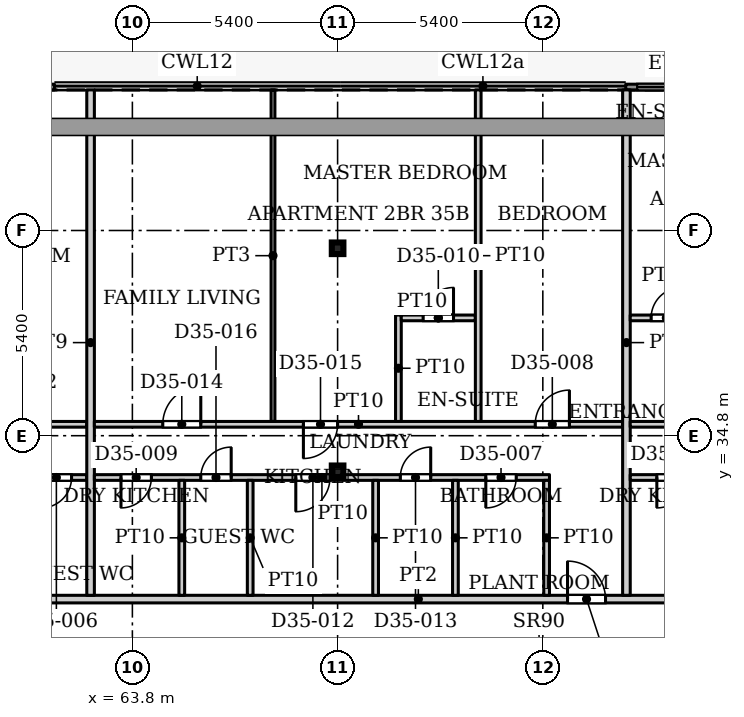
"""IFC4 building model, lengths in metres.
Left out: names, types, materials, properties, quantities, classifications, styles, units other than length and angle.
Written with IfcOpenShell. Run it as: python <this file> out.ifc"""

import sys

from ifc_helpers import new_model, si_unit, direction, frame, frame_2d, origin, origin_2d, place, context, subcontext, project, spatial, rectangle, hollow_rectangle, extrude, source, transform, mapped, element, fill, save


model = new_model("IFC4")
c1 = context("Model", 3, precision=1e-05, world=origin(), true_north=direction((0.0, 1.0)))
c2 = subcontext(c1, "Body", "Model", "MODEL_VIEW")
j1 = project(units=[si_unit("LENGTHUNIT", "METRE"), si_unit("PLANEANGLEUNIT", "RADIAN")], contexts=[c1])
p1 = place(None, origin())
s1 = spatial("IfcSite", under=j1, at=p1, CompositionType="ELEMENT")
p2 = place(p1, origin())
s2 = spatial("IfcBuilding", under=s1, at=p2, CompositionType="ELEMENT")
p3 = place(p2, frame((0.0, 0.0, 152.6)))
s3 = spatial("IfcBuildingStorey", under=s2, at=p3, CompositionType="ELEMENT", Elevation=152.6)
for number, where, z_axis, x_axis in (
    (1, (69.2, 33.863, 0.0), (0.0, 0.0, 1.0), (1.0, 0.0, 0.0)),
    (2, (69.2, 39.732, 0.0), (0.0, 0.0, 1.0), (1.0, 0.0, 0.0)),
):
    element("IfcColumn", number, at=place(p3, frame(where, z_axis=z_axis, x_axis=x_axis)), inside=s3, PredefinedType="COLUMN", context=c2, shape_type="SweptSolid", body=[
        extrude(hollow_rectangle(XDim=0.305, YDim=0.305, WallThickness=0.016, InnerFilletRadius=0.016, OuterFilletRadius=0.032, at=origin_2d()), origin(), (0.0, 0.0, 1.0), 3.9),
    ])
p4 = place(p3, frame((59.347, 43.975, 0.0), z_axis=(0.0, 0.0, 1.0), x_axis=(1.0, 0.0, 0.0)))
e3 = element("IfcWall", 3, at=p4, inside=s3, PredefinedType="SOLIDWALL", context=c2, shape_type="SweptSolid", body=[
    extrude(rectangle(XDim=2.401, YDim=0.15, at=frame_2d((1.201, 0.0))), origin(), (0.0, 0.0, 1.0), 3.75),
])
p5 = place(p4, frame((0.3, 0.0, 0.0)))
e4 = element("IfcOpeningElement", 4, at=p5, cuts=e3, PredefinedType="OPENING", context=c2, shape_type="SweptSolid", body=[
    extrude(rectangle(XDim=1.8, YDim=2.4, at=frame_2d((0.9, 1.2))), frame((0.0, 0.085, 0.0), z_axis=(0.0, -1.0, 0.0), x_axis=(1.0, 0.0, 0.0)), (0.0, 0.0, 1.0), 0.17),
])
p6 = place(p3, frame((76.782, 43.975, 0.0), z_axis=(0.0, 0.0, 1.0), x_axis=(1.0, 0.0, 0.0)))
e5 = element("IfcWall", 5, at=p6, inside=s3, PredefinedType="SOLIDWALL", context=c2, shape_type="SweptSolid", body=[
    extrude(rectangle(XDim=2.4, YDim=0.15, at=frame_2d((1.2, 0.0))), origin(), (0.0, 0.0, 1.0), 3.75),
])
p7 = place(p6, frame((0.3, 0.0, 0.0)))
e6 = element("IfcOpeningElement", 6, at=p7, cuts=e5, PredefinedType="OPENING", context=c2, shape_type="SweptSolid", body=[
    extrude(rectangle(XDim=1.8, YDim=2.4, at=frame_2d((0.9, 1.2))), frame((0.0, 0.085, 0.0), z_axis=(0.0, -1.0, 0.0), x_axis=(1.0, 0.0, 0.0)), (0.0, 0.0, 1.0), 0.17),
])
p8 = place(p3, frame((53.549, 30.5, 0.0), z_axis=(0.0, 0.0, 1.0), x_axis=(1.0, 0.0, 0.0)))
e7 = element("IfcWall", 7, at=p8, inside=s3, PredefinedType="PARTITIONING", context=c2, shape_type="SweptSolid", body=[
    extrude(rectangle(XDim=35.551, YDim=0.2, at=frame_2d((17.775, 0.0))), origin(), (0.0, 0.0, 1.0), 3.6),
])
p9 = place(p8, frame((0.251, 0.0, 0.0)))
e8 = element("IfcOpeningElement", 8, at=p9, cuts=e7, PredefinedType="OPENING", context=c2, shape_type="SweptSolid", body=[
    extrude(rectangle(XDim=1.0, YDim=2.1, at=frame_2d((0.5, 1.05))), frame((0.0, 0.11, 0.0), z_axis=(0.0, -1.0, 0.0), x_axis=(1.0, 0.0, 0.0)), (0.0, 0.0, 1.0), 0.22),
])
p10 = place(p8, frame((21.701, 0.0, 0.0)))
e9 = element("IfcOpeningElement", 9, at=p10, cuts=e7, PredefinedType="OPENING", context=c2, shape_type="SweptSolid", body=[
    extrude(rectangle(XDim=1.0, YDim=2.1, at=frame_2d((0.5, 1.05))), frame((0.0, 0.11, 0.0), z_axis=(0.0, -1.0, 0.0), x_axis=(1.0, 0.0, 0.0)), (0.0, 0.0, 1.0), 0.22),
])
p11 = place(p8, frame((32.201, 0.0, 0.0)))
e10 = element("IfcOpeningElement", 10, at=p11, cuts=e7, PredefinedType="OPENING", context=c2, shape_type="SweptSolid", body=[
    extrude(rectangle(XDim=1.0, YDim=2.1, at=frame_2d((0.5, 1.05))), frame((0.0, 0.11, 0.0), z_axis=(0.0, -1.0, 0.0), x_axis=(1.0, 0.0, 0.0)), (0.0, 0.0, 1.0), 0.22),
])
p12 = place(p3, frame((53.549, 35.1, 0.0), z_axis=(0.0, 0.0, 1.0), x_axis=(1.0, 0.0, 0.0)))
e11 = element("IfcWall", 11, at=p12, inside=s3, PredefinedType="PARTITIONING", context=c2, shape_type="SweptSolid", body=[
    extrude(rectangle(XDim=9.051, YDim=0.15, at=frame_2d((4.525, 0.0))), origin(), (0.0, 0.0, 1.0), 3.6),
])
p13 = place(p12, frame((6.751, 0.0, 0.0)))
e12 = element("IfcOpeningElement", 12, at=p13, cuts=e11, PredefinedType="OPENING", context=c2, shape_type="SweptSolid", body=[
    extrude(rectangle(XDim=0.9, YDim=2.1, at=frame_2d((0.45, 1.05))), frame((0.0, 0.085, 0.0), z_axis=(0.0, -1.0, 0.0), x_axis=(1.0, 0.0, 0.0)), (0.0, 0.0, 1.0), 0.17),
])
p14 = place(p12, frame((2.051, 0.0, 0.0)))
e13 = element("IfcOpeningElement", 13, at=p14, cuts=e11, PredefinedType="OPENING", context=c2, shape_type="SweptSolid", body=[
    extrude(rectangle(XDim=1.0, YDim=2.1, at=frame_2d((0.5, 1.05))), frame((0.0, 0.085, 0.0), z_axis=(0.0, -1.0, 0.0), x_axis=(1.0, 0.0, 0.0)), (0.0, 0.0, 1.0), 0.17),
])
p15 = place(p3, frame((55.125, 33.7, 0.0), z_axis=(0.0, 0.0, 1.0), x_axis=(1.0, 0.0, 0.0)))
e14 = element("IfcWall", 14, at=p15, inside=s3, PredefinedType="PARTITIONING", context=c2, shape_type="SweptSolid", body=[
    extrude(rectangle(XDim=7.475, YDim=0.15, at=frame_2d((3.738, 0.0))), origin(), (0.0, 0.0, 1.0), 3.6),
])
p16 = place(p15, frame((0.875, 0.0, 0.0)))
e15 = element("IfcOpeningElement", 15, at=p16, cuts=e14, PredefinedType="OPENING", context=c2, shape_type="SweptSolid", body=[
    extrude(rectangle(XDim=0.8, YDim=2.1, at=frame_2d((0.4, 1.05))), frame((0.0, 0.085, 0.0), z_axis=(0.0, -1.0, 0.0), x_axis=(1.0, 0.0, 0.0)), (0.0, 0.0, 1.0), 0.17),
])
p17 = place(p15, frame((3.675, 0.0, 0.0)))
e16 = element("IfcOpeningElement", 16, at=p17, cuts=e14, PredefinedType="OPENING", context=c2, shape_type="SweptSolid", body=[
    extrude(rectangle(XDim=0.9, YDim=2.1, at=frame_2d((0.45, 1.05))), frame((0.0, 0.085, 0.0), z_axis=(0.0, -1.0, 0.0), x_axis=(1.0, 0.0, 0.0)), (0.0, 0.0, 1.0), 0.17),
])
p18 = place(p15, frame((6.275, 0.0, 0.0)))
e17 = element("IfcOpeningElement", 17, at=p18, cuts=e14, PredefinedType="OPENING", context=c2, shape_type="SweptSolid", body=[
    extrude(rectangle(XDim=0.8, YDim=2.1, at=frame_2d((0.4, 1.05))), frame((0.0, 0.085, 0.0), z_axis=(0.0, -1.0, 0.0), x_axis=(1.0, 0.0, 0.0)), (0.0, 0.0, 1.0), 0.17),
])
p19 = place(p3, frame((62.7, 30.6, 0.0), z_axis=(0.0, 0.0, 1.0), x_axis=(0.0, 1.0, 0.0)))
e18 = element("IfcWall", 18, at=p19, inside=s3, PredefinedType="PARTITIONING", context=c2, shape_type="SweptSolid", body=[
    extrude(rectangle(XDim=13.3, YDim=0.2, at=frame_2d((6.65, 0.0))), origin(), (0.0, 0.0, 1.0), 3.6),
])
p20 = place(p3, frame((62.8, 33.7, 0.0), z_axis=(0.0, 0.0, 1.0), x_axis=(1.0, 0.0, 0.0)))
e19 = element("IfcWall", 19, at=p20, inside=s3, PredefinedType="PARTITIONING", context=c2, shape_type="SweptSolid", body=[
    extrude(rectangle(XDim=11.975, YDim=0.15, at=frame_2d((5.987, 0.0))), origin(), (0.0, 0.0, 1.0), 3.6),
])
p21 = place(p20, frame((10.3, 0.0, 0.0)))
e20 = element("IfcOpeningElement", 20, at=p21, cuts=e19, PredefinedType="OPENING", context=c2, shape_type="SweptSolid", body=[
    extrude(rectangle(XDim=0.8, YDim=2.1, at=frame_2d((0.4, 1.05))), frame((0.0, 0.085, 0.0), z_axis=(0.0, -1.0, 0.0), x_axis=(1.0, 0.0, 0.0)), (0.0, 0.0, 1.0), 0.17),
])
p22 = place(p20, frame((0.7, 0.0, 0.0)))
e21 = element("IfcOpeningElement", 21, at=p22, cuts=e19, PredefinedType="OPENING", context=c2, shape_type="SweptSolid", body=[
    extrude(rectangle(XDim=0.8, YDim=2.1, at=frame_2d((0.4, 1.05))), frame((0.0, 0.085, 0.0), z_axis=(0.0, -1.0, 0.0), x_axis=(1.0, 0.0, 0.0)), (0.0, 0.0, 1.0), 0.17),
])
p23 = place(p20, frame((5.3, 0.0, 0.0)))
e22 = element("IfcOpeningElement", 22, at=p23, cuts=e19, PredefinedType="OPENING", context=c2, shape_type="SweptSolid", body=[
    extrude(rectangle(XDim=0.9, YDim=2.1, at=frame_2d((0.45, 1.05))), frame((0.0, 0.085, 0.0), z_axis=(0.0, -1.0, 0.0), x_axis=(1.0, 0.0, 0.0)), (0.0, 0.0, 1.0), 0.17),
])
p24 = place(p20, frame((8.05, 0.0, 0.0)))
e23 = element("IfcOpeningElement", 23, at=p24, cuts=e19, PredefinedType="OPENING", context=c2, shape_type="SweptSolid", body=[
    extrude(rectangle(XDim=0.8, YDim=2.1, at=frame_2d((0.4, 1.05))), frame((0.0, 0.085, 0.0), z_axis=(0.0, -1.0, 0.0), x_axis=(1.0, 0.0, 0.0)), (0.0, 0.0, 1.0), 0.17),
])
p25 = place(p20, frame((2.8, 0.0, 0.0)))
e24 = element("IfcOpeningElement", 24, at=p25, cuts=e19, PredefinedType="OPENING", context=c2, shape_type="SweptSolid", body=[
    extrude(rectangle(XDim=0.8, YDim=2.1, at=frame_2d((0.4, 1.05))), frame((0.0, 0.085, 0.0), z_axis=(0.0, -1.0, 0.0), x_axis=(1.0, 0.0, 0.0)), (0.0, 0.0, 1.0), 0.17),
])
p26 = place(p3, frame((62.8, 35.1, 0.0), z_axis=(0.0, 0.0, 1.0), x_axis=(1.0, 0.0, 0.0)))
e25 = element("IfcWall", 25, at=p26, inside=s3, PredefinedType="PARTITIONING", context=c2, shape_type="SweptSolid", body=[
    extrude(rectangle(XDim=13.9, YDim=0.15, at=frame_2d((6.95, 0.0))), origin(), (0.0, 0.0, 1.0), 3.6),
])
p27 = place(p26, frame((11.6, 0.0, 0.0)))
e26 = element("IfcOpeningElement", 26, at=p27, cuts=e25, PredefinedType="OPENING", context=c2, shape_type="SweptSolid", body=[
    extrude(rectangle(XDim=0.9, YDim=2.1, at=frame_2d((0.45, 1.05))), frame((0.0, 0.085, 0.0), z_axis=(0.0, -1.0, 0.0), x_axis=(1.0, 0.0, 0.0)), (0.0, 0.0, 1.0), 0.17),
])
p28 = place(p26, frame((1.8, 0.0, 0.0)))
e27 = element("IfcOpeningElement", 27, at=p28, cuts=e25, PredefinedType="OPENING", context=c2, shape_type="SweptSolid", body=[
    extrude(rectangle(XDim=1.0, YDim=2.1, at=frame_2d((0.5, 1.05))), frame((0.0, 0.085, 0.0), z_axis=(0.0, -1.0, 0.0), x_axis=(1.0, 0.0, 0.0)), (0.0, 0.0, 1.0), 0.17),
])
p29 = place(p26, frame((5.5, 0.0, 0.0)))
e28 = element("IfcOpeningElement", 28, at=p29, cuts=e25, PredefinedType="OPENING", context=c2, shape_type="SweptSolid", body=[
    extrude(rectangle(XDim=0.9, YDim=2.1, at=frame_2d((0.45, 1.05))), frame((0.0, 0.085, 0.0), z_axis=(0.0, -1.0, 0.0), x_axis=(1.0, 0.0, 0.0)), (0.0, 0.0, 1.0), 0.17),
])
for number, where, z_axis, x_axis in (
    (29, (65.1, 30.6, 0.0), (0.0, 0.0, 1.0), (0.0, 1.0, 0.0)),
    (30, (66.9, 30.6, 0.0), (0.0, 0.0, 1.0), (0.0, 1.0, 0.0)),
):
    element("IfcWall", number, at=place(p3, frame(where, z_axis=z_axis, x_axis=x_axis)), inside=s3, PredefinedType="PARTITIONING", context=c2, shape_type="SweptSolid", body=[
        extrude(rectangle(XDim=3.025, YDim=0.15, at=frame_2d((1.512, 0.0))), origin(), (0.0, 0.0, 1.0), 3.6),
    ])
p30 = place(p3, frame((67.5, 35.175, 0.0), z_axis=(0.0, 0.0, 1.0), x_axis=(0.0, 1.0, 0.0)))
e31 = element("IfcWall", 31, at=p30, inside=s3, PredefinedType="PARTITIONING", context=c2, shape_type="SweptSolid", body=[
    extrude(rectangle(XDim=8.725, YDim=0.1, at=frame_2d((4.362, 0.0))), origin(), (0.0, 0.0, 1.0), 3.6),
])
p31 = place(p3, frame((70.2, 30.6, 0.0), z_axis=(0.0, 0.0, 1.0), x_axis=(0.0, 1.0, 0.0)))
e32 = element("IfcWall", 32, at=p31, inside=s3, PredefinedType="PARTITIONING", context=c2, shape_type="SweptSolid", body=[
    extrude(rectangle(XDim=3.025, YDim=0.15, at=frame_2d((1.512, 0.0))), origin(), (0.0, 0.0, 1.0), 3.6),
])
p32 = place(p3, frame((70.8, 35.175, 0.0), z_axis=(0.0, 0.0, 1.0), x_axis=(0.0, 1.0, 0.0)))
e33 = element("IfcWall", 33, at=p32, inside=s3, PredefinedType="PARTITIONING", context=c2, shape_type="SweptSolid", body=[
    extrude(rectangle(XDim=2.8, YDim=0.15, at=frame_2d((1.4, 0.0))), origin(), (0.0, 0.0, 1.0), 3.6),
])
p33 = place(p3, frame((70.875, 37.9, 0.0), z_axis=(0.0, 0.0, 1.0), x_axis=(1.0, 0.0, 0.0)))
e34 = element("IfcWall", 34, at=p33, inside=s3, PredefinedType="PARTITIONING", context=c2, shape_type="SweptSolid", body=[
    extrude(rectangle(XDim=1.95, YDim=0.15, at=frame_2d((0.975, 0.0))), origin(), (0.0, 0.0, 1.0), 3.6),
])
p34 = place(p33, frame((0.575, 0.0, 0.0)))
e35 = element("IfcOpeningElement", 35, at=p34, cuts=e34, PredefinedType="OPENING", context=c2, shape_type="SweptSolid", body=[
    extrude(rectangle(XDim=0.8, YDim=2.1, at=frame_2d((0.4, 1.05))), frame((0.0, 0.085, 0.0), z_axis=(0.0, -1.0, 0.0), x_axis=(1.0, 0.0, 0.0)), (0.0, 0.0, 1.0), 0.17),
])
p35 = place(p3, frame((72.3, 30.6, 0.0), z_axis=(0.0, 0.0, 1.0), x_axis=(0.0, 1.0, 0.0)))
e36 = element("IfcWall", 36, at=p35, inside=s3, PredefinedType="PARTITIONING", context=c2, shape_type="SweptSolid", body=[
    extrude(rectangle(XDim=3.025, YDim=0.15, at=frame_2d((1.512, 0.0))), origin(), (0.0, 0.0, 1.0), 3.6),
])
p36 = place(p3, frame((72.9, 35.175, 0.0), z_axis=(0.0, 0.0, 1.0), x_axis=(0.0, 1.0, 0.0)))
e37 = element("IfcWall", 37, at=p36, inside=s3, PredefinedType="PARTITIONING", context=c2, shape_type="SweptSolid", body=[
    extrude(rectangle(XDim=8.725, YDim=0.15, at=frame_2d((4.362, 0.0))), origin(), (0.0, 0.0, 1.0), 3.6),
])
p37 = place(p3, frame((74.7, 30.6, 0.0), z_axis=(0.0, 0.0, 1.0), x_axis=(0.0, 1.0, 0.0)))
e38 = element("IfcWall", 38, at=p37, inside=s3, PredefinedType="PARTITIONING", context=c2, shape_type="SweptSolid", body=[
    extrude(rectangle(XDim=3.025, YDim=0.15, at=frame_2d((1.512, 0.0))), origin(), (0.0, 0.0, 1.0), 3.6),
])
p38 = place(p3, frame((76.8, 30.6, 0.0), z_axis=(0.0, 0.0, 1.0), x_axis=(0.0, 1.0, 0.0)))
e39 = element("IfcWall", 39, at=p38, inside=s3, PredefinedType="PARTITIONING", context=c2, shape_type="SweptSolid", body=[
    extrude(rectangle(XDim=13.3, YDim=0.2, at=frame_2d((6.65, 0.0))), origin(), (0.0, 0.0, 1.0), 3.6),
])
p39 = place(p3, frame((76.9, 33.7, 0.0), z_axis=(0.0, 0.0, 1.0), x_axis=(1.0, 0.0, 0.0)))
e40 = element("IfcWall", 40, at=p39, inside=s3, PredefinedType="PARTITIONING", context=c2, shape_type="SweptSolid", body=[
    extrude(rectangle(XDim=8.375, YDim=0.15, at=frame_2d((4.188, 0.0))), origin(), (0.0, 0.0, 1.0), 3.6),
])
p40 = place(p39, frame((6.7, 0.0, 0.0)))
e41 = element("IfcOpeningElement", 41, at=p40, cuts=e40, PredefinedType="OPENING", context=c2, shape_type="SweptSolid", body=[
    extrude(rectangle(XDim=0.8, YDim=2.1, at=frame_2d((0.4, 1.05))), frame((0.0, 0.085, 0.0), z_axis=(0.0, -1.0, 0.0), x_axis=(1.0, 0.0, 0.0)), (0.0, 0.0, 1.0), 0.17),
])
p41 = place(p39, frame((0.7, 0.0, 0.0)))
e42 = element("IfcOpeningElement", 42, at=p41, cuts=e40, PredefinedType="OPENING", context=c2, shape_type="SweptSolid", body=[
    extrude(rectangle(XDim=0.8, YDim=2.1, at=frame_2d((0.4, 1.05))), frame((0.0, 0.085, 0.0), z_axis=(0.0, -1.0, 0.0), x_axis=(1.0, 0.0, 0.0)), (0.0, 0.0, 1.0), 0.17),
])
p42 = place(p39, frame((3.65, 0.0, 0.0)))
e43 = element("IfcOpeningElement", 43, at=p42, cuts=e40, PredefinedType="OPENING", context=c2, shape_type="SweptSolid", body=[
    extrude(rectangle(XDim=0.9, YDim=2.1, at=frame_2d((0.45, 1.05))), frame((0.0, 0.085, 0.0), z_axis=(0.0, -1.0, 0.0), x_axis=(1.0, 0.0, 0.0)), (0.0, 0.0, 1.0), 0.17),
])
p43 = place(p3, frame((76.9, 35.1, 0.0), z_axis=(0.0, 0.0, 1.0), x_axis=(1.0, 0.0, 0.0)))
e44 = element("IfcWall", 44, at=p43, inside=s3, PredefinedType="PARTITIONING", context=c2, shape_type="SweptSolid", body=[
    extrude(rectangle(XDim=12.2, YDim=0.15, at=frame_2d((6.1, 0.0))), origin(), (0.0, 0.0, 1.0), 3.6),
])
p44 = place(p43, frame((6.2, 0.0, 0.0)))
e45 = element("IfcOpeningElement", 45, at=p44, cuts=e44, PredefinedType="OPENING", context=c2, shape_type="SweptSolid", body=[
    extrude(rectangle(XDim=0.9, YDim=2.1, at=frame_2d((0.45, 1.05))), frame((0.0, 0.085, 0.0), z_axis=(0.0, -1.0, 0.0), x_axis=(1.0, 0.0, 0.0)), (0.0, 0.0, 1.0), 0.17),
])
p45 = place(p43, frame((9.6, 0.0, 0.0)))
e46 = element("IfcOpeningElement", 46, at=p45, cuts=e44, PredefinedType="OPENING", context=c2, shape_type="SweptSolid", body=[
    extrude(rectangle(XDim=1.0, YDim=2.1, at=frame_2d((0.5, 1.05))), frame((0.0, 0.085, 0.0), z_axis=(0.0, -1.0, 0.0), x_axis=(1.0, 0.0, 0.0)), (0.0, 0.0, 1.0), 0.17),
])
p46 = place(p43, frame((3.2, 0.0, 0.0)))
e47 = element("IfcOpeningElement", 47, at=p46, cuts=e44, PredefinedType="OPENING", context=c2, shape_type="SweptSolid", body=[
    extrude(rectangle(XDim=0.9, YDim=2.1, at=frame_2d((0.45, 1.05))), frame((0.0, 0.085, 0.0), z_axis=(0.0, -1.0, 0.0), x_axis=(1.0, 0.0, 0.0)), (0.0, 0.0, 1.0), 0.17),
])
p47 = place(p3, frame((76.9, 37.9, 0.0), z_axis=(0.0, 0.0, 1.0), x_axis=(1.0, 0.0, 0.0)))
e48 = element("IfcWall", 48, at=p47, inside=s3, PredefinedType="PARTITIONING", context=c2, shape_type="SweptSolid", body=[
    extrude(rectangle(XDim=1.925, YDim=0.15, at=frame_2d((0.962, 0.0))), origin(), (0.0, 0.0, 1.0), 3.6),
])
p48 = place(p47, frame((0.55, 0.0, 0.0)))
e49 = element("IfcOpeningElement", 49, at=p48, cuts=e48, PredefinedType="OPENING", context=c2, shape_type="SweptSolid", body=[
    extrude(rectangle(XDim=0.8, YDim=2.1, at=frame_2d((0.4, 1.05))), frame((0.0, 0.085, 0.0), z_axis=(0.0, -1.0, 0.0), x_axis=(1.0, 0.0, 0.0)), (0.0, 0.0, 1.0), 0.17),
])
m1 = source(origin(), c2, "Body", "SweptSolid", [
    extrude(rectangle(XDim=1.8, YDim=2.4, at=frame_2d((0.9, 1.2))), frame((0.0, 0.025, 0.0), z_axis=(0.0, -1.0, 0.0), x_axis=(1.0, 0.0, 0.0)), (0.0, 0.0, 1.0), 0.05),
])
p49 = place(p7, origin())
e50 = element("IfcDoor", 50, at=p49, inside=s3, OperationType="SLIDING_TO_LEFT", PredefinedType="DOOR", context=c2, shape_type="MappedRepresentation", body=[
    mapped(m1, transform((0.0, 0.0, 0.0), x_axis=(1.0, 0.0, 0.0), y_axis=(0.0, 1.0, 0.0), z_axis=(0.0, 0.0, 1.0), scale=1.0)),
])
fill(e6, e50)
m2 = source(origin(), c2, "Body", "SweptSolid", [
    extrude(rectangle(XDim=0.8, YDim=2.1, at=frame_2d((0.4, 1.05))), frame((0.0, 0.025, 0.0), z_axis=(0.0, -1.0, 0.0), x_axis=(1.0, 0.0, 0.0)), (0.0, 0.0, 1.0), 0.05),
])
p50 = place(p18, origin())
e51 = element("IfcDoor", 51, at=p50, inside=s3, OperationType="SINGLE_SWING_RIGHT", PredefinedType="DOOR", context=c2, shape_type="MappedRepresentation", body=[
    mapped(m2, transform((0.0, 0.0, 0.0), x_axis=(1.0, 0.0, 0.0), y_axis=(0.0, 1.0, 0.0), z_axis=(0.0, 0.0, 1.0), scale=1.0)),
])
fill(e17, e51)
p51 = place(p21, origin())
e52 = element("IfcDoor", 52, at=p51, inside=s3, OperationType="SINGLE_SWING_RIGHT", PredefinedType="DOOR", context=c2, shape_type="MappedRepresentation", body=[
    mapped(m2, transform((0.0, 0.0, 0.0), x_axis=(1.0, 0.0, 0.0), y_axis=(0.0, 1.0, 0.0), z_axis=(0.0, 0.0, 1.0), scale=1.0)),
])
fill(e20, e52)
m3 = source(origin(), c2, "Body", "SweptSolid", [
    extrude(rectangle(XDim=0.9, YDim=2.1, at=frame_2d((0.45, 1.05))), frame((0.0, 0.025, 0.0), z_axis=(0.0, -1.0, 0.0), x_axis=(1.0, 0.0, 0.0)), (0.0, 0.0, 1.0), 0.05),
])
p52 = place(p27, origin())
e53 = element("IfcDoor", 53, at=p52, inside=s3, OperationType="SINGLE_SWING_LEFT", PredefinedType="DOOR", context=c2, shape_type="MappedRepresentation", body=[
    mapped(m3, transform((0.0, 0.0, 0.0), x_axis=(1.0, 0.0, 0.0), y_axis=(0.0, 1.0, 0.0), z_axis=(0.0, 0.0, 1.0), scale=1.0)),
])
fill(e26, e53)
p53 = place(p22, origin())
e54 = element("IfcDoor", 54, at=p53, inside=s3, OperationType="SINGLE_SWING_RIGHT", PredefinedType="DOOR", context=c2, shape_type="MappedRepresentation", body=[
    mapped(m2, transform((0.0, 0.0, 0.0), x_axis=(1.0, 0.0, 0.0), y_axis=(0.0, 1.0, 0.0), z_axis=(0.0, 0.0, 1.0), scale=1.0)),
])
fill(e21, e54)
p54 = place(p34, origin())
e55 = element("IfcDoor", 55, at=p54, inside=s3, OperationType="SINGLE_SWING_LEFT", PredefinedType="DOOR", context=c2, shape_type="MappedRepresentation", body=[
    mapped(m2, transform((0.0, 0.0, 0.0), x_axis=(1.0, 0.0, 0.0), y_axis=(0.0, 1.0, 0.0), z_axis=(0.0, 0.0, 1.0), scale=1.0)),
])
fill(e35, e55)
m4 = source(origin(), c2, "Body", "SweptSolid", [
    extrude(rectangle(XDim=1.0, YDim=2.1, at=frame_2d((0.5, 1.05))), frame((0.0, 0.025, 0.0), z_axis=(0.0, -1.0, 0.0), x_axis=(1.0, 0.0, 0.0)), (0.0, 0.0, 1.0), 0.05),
])
p55 = place(p10, origin())
e56 = element("IfcDoor", 56, at=p55, inside=s3, OperationType="SINGLE_SWING_LEFT", PredefinedType="DOOR", context=c2, shape_type="MappedRepresentation", body=[
    mapped(m4, transform((0.0, 0.0, 0.0), x_axis=(1.0, 0.0, 0.0), y_axis=(0.0, 1.0, 0.0), z_axis=(0.0, 0.0, 1.0), scale=1.0)),
])
fill(e9, e56)
p56 = place(p23, origin())
e57 = element("IfcDoor", 57, at=p56, inside=s3, OperationType="SINGLE_SWING_RIGHT", PredefinedType="DOOR", context=c2, shape_type="MappedRepresentation", body=[
    mapped(m3, transform((0.0, 0.0, 0.0), x_axis=(1.0, 0.0, 0.0), y_axis=(0.0, 1.0, 0.0), z_axis=(0.0, 0.0, 1.0), scale=1.0)),
])
fill(e22, e57)
p57 = place(p24, origin())
e58 = element("IfcDoor", 58, at=p57, inside=s3, OperationType="SINGLE_SWING_LEFT", PredefinedType="DOOR", context=c2, shape_type="MappedRepresentation", body=[
    mapped(m2, transform((0.0, 0.0, 0.0), x_axis=(1.0, 0.0, 0.0), y_axis=(0.0, 1.0, 0.0), z_axis=(0.0, 0.0, 1.0), scale=1.0)),
])
fill(e23, e58)
m5 = source(origin(), c2, "Body", "SweptSolid", [
    extrude(rectangle(XDim=1.0, YDim=2.1, at=frame_2d((0.5, 1.05))), frame((0.0, 0.025, 0.0), z_axis=(0.0, -1.0, 0.0), x_axis=(1.0, 0.0, 0.0)), (0.0, 0.0, 1.0), 0.05),
])
p58 = place(p28, origin())
e59 = element("IfcDoor", 59, at=p58, inside=s3, OperationType="SINGLE_SWING_LEFT", PredefinedType="DOOR", context=c2, shape_type="MappedRepresentation", body=[
    mapped(m5, transform((0.0, 0.0, 0.0), x_axis=(1.0, 0.0, 0.0), y_axis=(0.0, 1.0, 0.0), z_axis=(0.0, 0.0, 1.0), scale=1.0)),
])
fill(e27, e59)
p59 = place(p29, origin())
e60 = element("IfcDoor", 60, at=p59, inside=s3, OperationType="SINGLE_SWING_RIGHT", PredefinedType="DOOR", context=c2, shape_type="MappedRepresentation", body=[
    mapped(m3, transform((0.0, 0.0, 0.0), x_axis=(1.0, 0.0, 0.0), y_axis=(0.0, 1.0, 0.0), z_axis=(0.0, 0.0, 1.0), scale=1.0)),
])
fill(e28, e60)
p60 = place(p25, origin())
e61 = element("IfcDoor", 61, at=p60, inside=s3, OperationType="SINGLE_SWING_LEFT", PredefinedType="DOOR", context=c2, shape_type="MappedRepresentation", body=[
    mapped(m2, transform((0.0, 0.0, 0.0), x_axis=(1.0, 0.0, 0.0), y_axis=(0.0, 1.0, 0.0), z_axis=(0.0, 0.0, 1.0), scale=1.0)),
])
fill(e24, e61)
p61 = place(p41, origin())
e62 = element("IfcDoor", 62, at=p61, inside=s3, OperationType="SINGLE_SWING_RIGHT", PredefinedType="DOOR", context=c2, shape_type="MappedRepresentation", body=[
    mapped(m2, transform((0.0, 0.0, 0.0), x_axis=(1.0, 0.0, 0.0), y_axis=(0.0, 1.0, 0.0), z_axis=(0.0, 0.0, 1.0), scale=1.0)),
])
fill(e42, e62)
p62 = place(p48, origin())
e63 = element("IfcDoor", 63, at=p62, inside=s3, OperationType="SINGLE_SWING_LEFT", PredefinedType="DOOR", context=c2, shape_type="MappedRepresentation", body=[
    mapped(m2, transform((0.0, 0.0, 0.0), x_axis=(1.0, 0.0, 0.0), y_axis=(0.0, 1.0, 0.0), z_axis=(0.0, 0.0, 1.0), scale=1.0)),
])
fill(e49, e63)
save(model, sys.argv[1])
